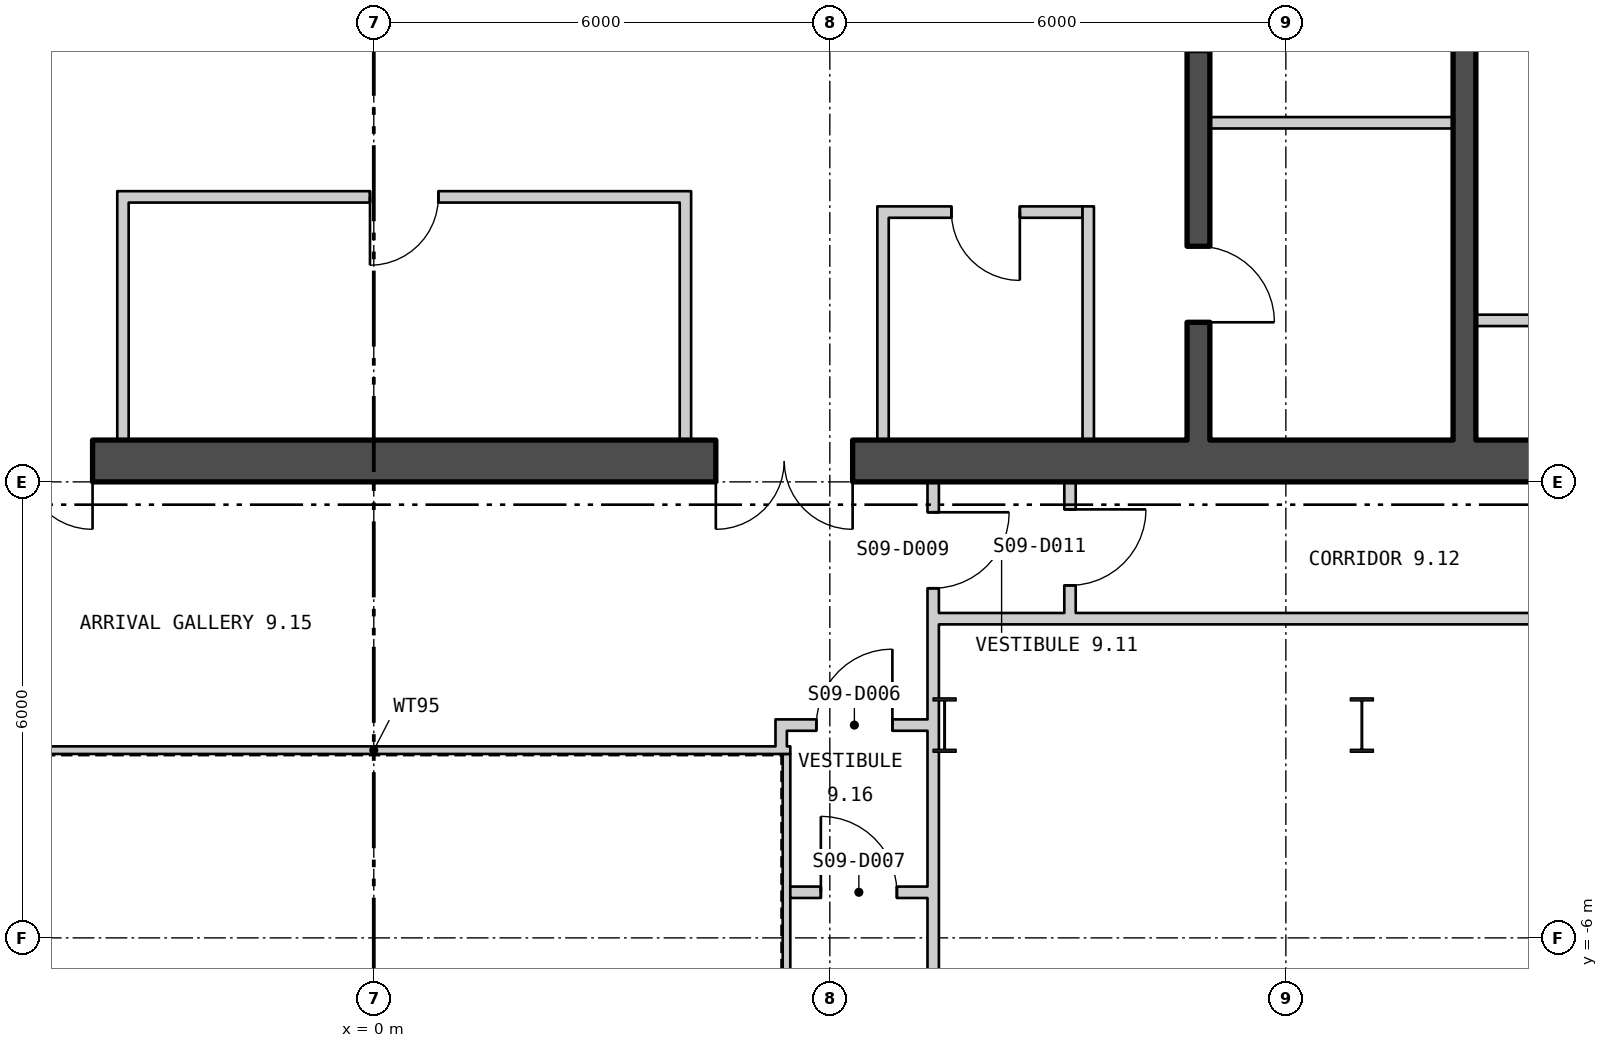
"""IFC4 building model, lengths in metres.
Left out: names, types, materials, properties, quantities, classifications, styles, units other than length and angle.
Written with IfcOpenShell. Run it as: python <this file> out.ifc"""

import sys

from ifc_helpers import new_model, si_unit, direction, frame, frame_2d, origin, origin_2d, place, context, subcontext, project, spatial, polyline, rectangle, i_section, outline, extrude, element, fill, save


model = new_model("IFC4")
c1 = context("Model", 3, precision=1e-05, world=origin(), true_north=direction((0.0, 1.0)))
c2 = subcontext(c1, "Body", "Model", "MODEL_VIEW")
j1 = project(units=[si_unit("LENGTHUNIT", "METRE"), si_unit("PLANEANGLEUNIT", "RADIAN")], contexts=[c1])
p1 = place(None, origin())
s1 = spatial("IfcSite", under=j1, at=p1, CompositionType="ELEMENT")
p2 = place(p1, origin())
s2 = spatial("IfcBuilding", under=s1, at=p2, CompositionType="ELEMENT")
p3 = place(p2, frame((0.0, 0.0, 124.8)))
s3 = spatial("IfcBuildingStorey", under=s2, at=p3, CompositionType="ELEMENT", Elevation=124.8)
for number, where, z_axis, x_axis in (
    (1, (7.51, -3.2, 0.0), (0.0, 0.0, 1.0), (1.0, 0.0, 0.0)),
    (2, (13.0, -3.2, 0.0), (0.0, 0.0, 1.0), (1.0, 0.0, 0.0)),
):
    element("IfcColumn", number, at=place(p3, frame(where, z_axis=z_axis, x_axis=x_axis)), inside=s3, PredefinedType="COLUMN", context=c2, shape_type="SweptSolid", body=[
        extrude(i_section(OverallWidth=0.304, OverallDepth=0.716, WebThickness=0.021, FlangeThickness=0.04, at=origin_2d()), origin(), (0.0, 0.0, 1.0), 4.5),
    ])
p4 = place(p3, frame((4.58, -27.57, -0.18), z_axis=(0.0, 0.0, 1.0), x_axis=(0.500000711659, 0.866024992908, 0.0)))
e3 = element("IfcWall", 3, at=p4, inside=s3, PredefinedType="SOLIDWALL", context=c2, shape_type="SweptSolid", body=[
    extrude(outline(polyline([(-0.13, -0.225), (45.87, -0.225), (45.61, 0.225), (0.13, 0.225), (-0.13, -0.225)])), origin(), (0.0, 0.0, 1.0), 4.28),
])
p5 = place(p4, frame((1.424, 0.0, 1.08)))
e4 = element("IfcOpeningElement", 4, at=p5, cuts=e3, PredefinedType="OPENING", context=c2, shape_type="SweptSolid", body=[
    extrude(rectangle(XDim=2.4, YDim=2.6, at=frame_2d((1.2, 1.3))), frame((0.0, 0.235, 0.0), z_axis=(0.0, -1.0, 0.0), x_axis=(1.0, 0.0, 0.0)), (0.0, 0.0, 1.0), 0.47),
])
p6 = place(p4, frame((5.893, 0.0, 1.08)))
e5 = element("IfcOpeningElement", 5, at=p6, cuts=e3, PredefinedType="OPENING", context=c2, shape_type="SweptSolid", body=[
    extrude(rectangle(XDim=2.4, YDim=2.6, at=frame_2d((1.2, 1.3))), frame((0.0, 0.235, 0.0), z_axis=(0.0, -1.0, 0.0), x_axis=(1.0, 0.0, 0.0)), (0.0, 0.0, 1.0), 0.47),
])
p7 = place(p4, frame((10.401, 0.0, 1.08)))
e6 = element("IfcOpeningElement", 6, at=p7, cuts=e3, PredefinedType="OPENING", context=c2, shape_type="SweptSolid", body=[
    extrude(rectangle(XDim=2.4, YDim=2.6, at=frame_2d((1.2, 1.3))), frame((0.0, 0.235, 0.0), z_axis=(0.0, -1.0, 0.0), x_axis=(1.0, 0.0, 0.0)), (0.0, 0.0, 1.0), 0.47),
])
p8 = place(p4, frame((14.909, 0.0, 1.08)))
e7 = element("IfcOpeningElement", 7, at=p8, cuts=e3, PredefinedType="OPENING", context=c2, shape_type="SweptSolid", body=[
    extrude(rectangle(XDim=2.4, YDim=2.6, at=frame_2d((1.2, 1.3))), frame((0.0, 0.235, 0.0), z_axis=(0.0, -1.0, 0.0), x_axis=(1.0, 0.0, 0.0)), (0.0, 0.0, 1.0), 0.47),
])
p9 = place(p4, frame((19.416, 0.0, 1.08)))
e8 = element("IfcOpeningElement", 8, at=p9, cuts=e3, PredefinedType="OPENING", context=c2, shape_type="SweptSolid", body=[
    extrude(rectangle(XDim=2.4, YDim=2.6, at=frame_2d((1.2, 1.3))), frame((0.0, 0.235, 0.0), z_axis=(0.0, -1.0, 0.0), x_axis=(1.0, 0.0, 0.0)), (0.0, 0.0, 1.0), 0.47),
])
p10 = place(p4, frame((23.924, 0.0, 1.08)))
e9 = element("IfcOpeningElement", 9, at=p10, cuts=e3, PredefinedType="OPENING", context=c2, shape_type="SweptSolid", body=[
    extrude(rectangle(XDim=2.4, YDim=2.6, at=frame_2d((1.2, 1.3))), frame((0.0, 0.235, 0.0), z_axis=(0.0, -1.0, 0.0), x_axis=(1.0, 0.0, 0.0)), (0.0, 0.0, 1.0), 0.47),
])
p11 = place(p4, frame((32.939, 0.0, 1.08)))
e10 = element("IfcOpeningElement", 10, at=p11, cuts=e3, PredefinedType="OPENING", context=c2, shape_type="SweptSolid", body=[
    extrude(rectangle(XDim=2.4, YDim=2.6, at=frame_2d((1.2, 1.3))), frame((0.0, 0.235, 0.0), z_axis=(0.0, -1.0, 0.0), x_axis=(1.0, 0.0, 0.0)), (0.0, 0.0, 1.0), 0.47),
])
p12 = place(p4, frame((37.447, 0.0, 1.08)))
e11 = element("IfcOpeningElement", 11, at=p12, cuts=e3, PredefinedType="OPENING", context=c2, shape_type="SweptSolid", body=[
    extrude(rectangle(XDim=2.4, YDim=2.6, at=frame_2d((1.2, 1.3))), frame((0.0, 0.235, 0.0), z_axis=(0.0, -1.0, 0.0), x_axis=(1.0, 0.0, 0.0)), (0.0, 0.0, 1.0), 0.47),
])
p13 = place(p4, frame((41.916, 0.0, 1.08)))
e12 = element("IfcOpeningElement", 12, at=p13, cuts=e3, PredefinedType="OPENING", context=c2, shape_type="SweptSolid", body=[
    extrude(rectangle(XDim=2.4, YDim=2.6, at=frame_2d((1.2, 1.3))), frame((0.0, 0.235, 0.0), z_axis=(0.0, -1.0, 0.0), x_axis=(1.0, 0.0, 0.0)), (0.0, 0.0, 1.0), 0.47),
])
p14 = place(p3, frame((5.43, -11.62, 0.0), z_axis=(0.0, 0.0, 1.0), x_axis=(0.0, 1.0, 0.0)))
e13 = element("IfcWall", 13, at=p14, inside=s3, PredefinedType="PARTITIONING", context=c2, shape_type="SweptSolid", body=[
    extrude(rectangle(XDim=8.04, YDim=0.1, at=frame_2d((4.02, 0.0))), origin(), (0.0, 0.0, 1.0), 4.3),
])
p15 = place(p3, frame((5.48, -3.53, 0.0), z_axis=(0.0, 0.0, 1.0), x_axis=(-1.0, 0.0, 0.0)))
e14 = element("IfcWall", 14, at=p15, inside=s3, PredefinedType="PARTITIONING", context=c2, shape_type="SweptSolid", body=[
    extrude(rectangle(XDim=10.96, YDim=0.1, at=frame_2d((5.48, 0.0))), origin(), (0.0, 0.0, 1.0), 4.3),
])
p16 = place(p3, frame((-17.5, 0.275, 0.0), z_axis=(0.0, 0.0, 1.0), x_axis=(1.0, 0.0, 0.0)))
e15 = element("IfcWall", 15, at=p16, inside=s3, PredefinedType="SHEAR", context=c2, shape_type="SweptSolid", body=[
    extrude(rectangle(XDim=35.0, YDim=0.55, at=frame_2d((17.5, 0.0))), origin(), (0.0, 0.0, 1.0), 4.3),
])
p17 = place(p16, frame((12.0, 0.0, 0.0)))
e16 = element("IfcOpeningElement", 16, at=p17, cuts=e15, PredefinedType="OPENING", context=c2, shape_type="SweptSolid", body=[
    extrude(rectangle(XDim=1.8, YDim=2.4, at=frame_2d((0.9, 1.2))), frame((0.0, 0.285, 0.0), z_axis=(0.0, -1.0, 0.0), x_axis=(1.0, 0.0, 0.0)), (0.0, 0.0, 1.0), 0.57),
])
p18 = place(p16, frame((22.0, 0.0, 0.0)))
e17 = element("IfcOpeningElement", 17, at=p18, cuts=e15, PredefinedType="OPENING", context=c2, shape_type="SweptSolid", body=[
    extrude(rectangle(XDim=1.8, YDim=2.4, at=frame_2d((0.9, 1.2))), frame((0.0, 0.285, 0.0), z_axis=(0.0, -1.0, 0.0), x_axis=(1.0, 0.0, 0.0)), (0.0, 0.0, 1.0), 0.57),
])
p19 = place(p3, frame((10.85, 0.55, 0.0), z_axis=(0.0, 0.0, 1.0), x_axis=(0.0, 1.0, 0.0)))
e18 = element("IfcWall", 18, at=p19, inside=s3, PredefinedType="SHEAR", context=c2, shape_type="SweptSolid", body=[
    extrude(rectangle(XDim=16.9, YDim=0.3, at=frame_2d((8.45, 0.0))), origin(), (0.0, 0.0, 1.0), 4.3),
])
p20 = place(p19, frame((5.125, 0.0, 0.0)))
e19 = element("IfcOpeningElement", 19, at=p20, cuts=e18, PredefinedType="OPENING", context=c2, shape_type="SweptSolid", body=[
    extrude(rectangle(XDim=1.25, YDim=2.1, at=frame_2d((0.625, 1.05))), frame((0.0, 0.16, 0.0), z_axis=(0.0, -1.0, 0.0), x_axis=(1.0, 0.0, 0.0)), (0.0, 0.0, 1.0), 0.32),
])
p21 = place(p19, frame((1.55, 0.0, 0.0)))
e20 = element("IfcOpeningElement", 20, at=p21, cuts=e18, PredefinedType="OPENING", context=c2, shape_type="SweptSolid", body=[
    extrude(rectangle(XDim=1.0, YDim=2.1, at=frame_2d((0.5, 1.05))), frame((0.0, 0.16, 0.0), z_axis=(0.0, -1.0, 0.0), x_axis=(1.0, 0.0, 0.0)), (0.0, 0.0, 1.0), 0.32),
])
p22 = place(p3, frame((14.35, 0.55, 0.0), z_axis=(0.0, 0.0, 1.0), x_axis=(0.0, 1.0, 0.0)))
e21 = element("IfcWall", 21, at=p22, inside=s3, PredefinedType="SHEAR", context=c2, shape_type="SweptSolid", body=[
    extrude(rectangle(XDim=16.9, YDim=0.3, at=frame_2d((8.45, 0.0))), origin(), (0.0, 0.0, 1.0), 4.3),
])
p23 = place(p22, frame((5.75, 0.0, 0.0)))
e22 = element("IfcOpeningElement", 22, at=p23, cuts=e21, PredefinedType="OPENING", context=c2, shape_type="SweptSolid", body=[
    extrude(rectangle(XDim=1.5, YDim=2.1, at=frame_2d((0.75, 1.05))), frame((0.0, 0.16, 0.0), z_axis=(0.0, -1.0, 0.0), x_axis=(1.0, 0.0, 0.0)), (0.0, 0.0, 1.0), 0.32),
])
p24 = place(p3, frame((11.0, 4.725, 0.0), z_axis=(0.0, 0.0, 1.0), x_axis=(1.0, 0.0, 0.0)))
e23 = element("IfcWall", 23, at=p24, inside=s3, PredefinedType="PARTITIONING", context=c2, shape_type="SweptSolid", body=[
    extrude(rectangle(XDim=3.2, YDim=0.15, at=frame_2d((1.6, 0.0))), origin(), (0.0, 0.0, 1.0), 4.3),
])
p25 = place(p3, frame((14.5, 2.125, 0.0), z_axis=(0.0, 0.0, 1.0), x_axis=(1.0, 0.0, 0.0)))
e24 = element("IfcWall", 24, at=p25, inside=s3, PredefinedType="PARTITIONING", context=c2, shape_type="SweptSolid", body=[
    extrude(rectangle(XDim=2.45, YDim=0.15, at=frame_2d((1.225, 0.0))), origin(), (0.0, 0.0, 1.0), 4.3),
])
for number, where, z_axis, x_axis in (
    (25, (-3.3, 0.55, 0.0), (0.0, 0.0, 1.0), (0.0, 1.0, 0.0)),
    (26, (4.1, 0.55, 0.0), (0.0, 0.0, 1.0), (0.0, 1.0, 0.0)),
):
    element("IfcWall", number, at=place(p3, frame(where, z_axis=z_axis, x_axis=x_axis)), inside=s3, PredefinedType="PARTITIONING", context=c2, shape_type="SweptSolid", body=[
        extrude(rectangle(XDim=3.275, YDim=0.15, at=frame_2d((1.637, 0.0))), origin(), (0.0, 0.0, 1.0), 4.3),
    ])
p26 = place(p3, frame((-3.225, 3.75, 0.0), z_axis=(0.0, 0.0, 1.0), x_axis=(1.0, 0.0, 0.0)))
e27 = element("IfcWall", 27, at=p26, inside=s3, PredefinedType="PARTITIONING", context=c2, shape_type="SweptSolid", body=[
    extrude(rectangle(XDim=7.25, YDim=0.15, at=frame_2d((3.625, 0.0))), origin(), (0.0, 0.0, 1.0), 4.3),
])
p27 = place(p26, frame((3.175, 0.0, 0.0)))
e28 = element("IfcOpeningElement", 28, at=p27, cuts=e27, PredefinedType="OPENING", context=c2, shape_type="SweptSolid", body=[
    extrude(rectangle(XDim=0.9, YDim=2.1, at=frame_2d((0.45, 1.05))), frame((0.0, 0.085, 0.0), z_axis=(0.0, -1.0, 0.0), x_axis=(1.0, 0.0, 0.0)), (0.0, 0.0, 1.0), 0.17),
])
for number, where, z_axis, x_axis in (
    (29, (6.7, 0.55, 0.0), (0.0, 0.0, 1.0), (0.0, 1.0, 0.0)),
    (30, (9.4, 0.55, 0.0), (0.0, 0.0, 1.0), (0.0, 1.0, 0.0)),
):
    element("IfcWall", number, at=place(p3, frame(where, z_axis=z_axis, x_axis=x_axis)), inside=s3, PredefinedType="PARTITIONING", context=c2, shape_type="SweptSolid", body=[
        extrude(rectangle(XDim=3.075, YDim=0.15, at=frame_2d((1.538, 0.0))), origin(), (0.0, 0.0, 1.0), 4.3),
    ])
p28 = place(p3, frame((6.775, 3.55, 0.0), z_axis=(0.0, 0.0, 1.0), x_axis=(1.0, 0.0, 0.0)))
e31 = element("IfcWall", 31, at=p28, inside=s3, PredefinedType="PARTITIONING", context=c2, shape_type="SweptSolid", body=[
    extrude(rectangle(XDim=2.55, YDim=0.15, at=frame_2d((1.275, 0.0))), origin(), (0.0, 0.0, 1.0), 4.3),
])
p29 = place(p28, frame((0.825, 0.0, 0.0)))
e32 = element("IfcOpeningElement", 32, at=p29, cuts=e31, PredefinedType="OPENING", context=c2, shape_type="SweptSolid", body=[
    extrude(rectangle(XDim=0.9, YDim=2.1, at=frame_2d((0.45, 1.05))), frame((0.0, 0.085, 0.0), z_axis=(0.0, -1.0, 0.0), x_axis=(1.0, 0.0, 0.0)), (0.0, 0.0, 1.0), 0.17),
])
p30 = place(p3, frame((5.285, -3.2, 0.0), z_axis=(0.0, 0.0, 1.0), x_axis=(1.0, 0.0, 0.0)))
e33 = element("IfcWall", 33, at=p30, inside=s3, PredefinedType="PARTITIONING", context=c2, shape_type="SweptSolid", body=[
    extrude(rectangle(XDim=2.0, YDim=0.15, at=frame_2d((1.0, 0.0))), origin(), (0.0, 0.0, 1.0), 3.39),
])
p31 = place(p30, frame((0.538, 0.0, 0.0)))
e34 = element("IfcOpeningElement", 34, at=p31, cuts=e33, PredefinedType="OPENING", context=c2, shape_type="SweptSolid", body=[
    extrude(rectangle(XDim=1.0, YDim=2.1, at=frame_2d((0.5, 1.05))), frame((0.0, 0.085, 0.0), z_axis=(0.0, -1.0, 0.0), x_axis=(1.0, 0.0, 0.0)), (0.0, 0.0, 1.0), 0.17),
])
p32 = place(p3, frame((5.36, -3.48, 0.0), z_axis=(0.0, 0.0, 1.0), x_axis=(0.0, 1.0, 0.0)))
e35 = element("IfcWall", 35, at=p32, inside=s3, PredefinedType="PARTITIONING", context=c2, shape_type="SweptSolid", body=[
    extrude(rectangle(XDim=0.205, YDim=0.15, at=frame_2d((0.102, 0.0))), origin(), (0.0, 0.0, 1.0), 4.3),
])
p33 = place(p3, frame((5.48, -5.4, 0.0), z_axis=(0.0, 0.0, 1.0), x_axis=(1.0, 0.0, 0.0)))
e36 = element("IfcWall", 36, at=p33, inside=s3, PredefinedType="PARTITIONING", context=c2, shape_type="SweptSolid", body=[
    extrude(rectangle(XDim=1.805, YDim=0.15, at=frame_2d((0.902, 0.0))), origin(), (0.0, 0.0, 1.0), 4.3),
])
p34 = place(p33, frame((0.402, 0.0, 0.0)))
e37 = element("IfcOpeningElement", 37, at=p34, cuts=e36, PredefinedType="OPENING", context=c2, shape_type="SweptSolid", body=[
    extrude(rectangle(XDim=1.0, YDim=2.1, at=frame_2d((0.5, 1.05))), frame((0.0, 0.085, 0.0), z_axis=(0.0, -1.0, 0.0), x_axis=(1.0, 0.0, 0.0)), (0.0, 0.0, 1.0), 0.17),
])
p35 = place(p3, frame((7.36, -13.675, 0.0), z_axis=(0.0, 0.0, 1.0), x_axis=(0.0, 1.0, 0.0)))
e38 = element("IfcWall", 38, at=p35, inside=s3, PredefinedType="PARTITIONING", context=c2, shape_type="SweptSolid", body=[
    extrude(rectangle(XDim=10.167, YDim=0.15, at=frame_2d((5.083, 0.0))), origin(), (0.0, 0.0, 1.0), 3.7),
])
p36 = place(p35, frame((3.531, 0.0, 0.0)))
e39 = element("IfcOpeningElement", 39, at=p36, cuts=e38, PredefinedType="OPENING", context=c2, shape_type="SweptSolid", body=[
    extrude(rectangle(XDim=1.0, YDim=2.1, at=frame_2d((0.5, 1.05))), frame((0.0, 0.085, 0.0), z_axis=(0.0, -1.0, 0.0), x_axis=(1.0, 0.0, 0.0)), (0.0, 0.0, 1.0), 0.17),
])
p37 = place(p3, frame((7.36, -3.508, 0.0), z_axis=(0.0, 0.0, 1.0), x_axis=(0.0, 1.0, 0.0)))
e40 = element("IfcWall", 40, at=p37, inside=s3, PredefinedType="PARTITIONING", context=c2, shape_type="SweptSolid", body=[
    extrude(rectangle(XDim=3.508, YDim=0.15, at=frame_2d((1.754, 0.0))), origin(), (0.0, 0.0, 1.0), 4.3),
])
p38 = place(p37, frame((2.108, 0.0, 0.0)))
e41 = element("IfcOpeningElement", 41, at=p38, cuts=e40, PredefinedType="OPENING", context=c2, shape_type="SweptSolid", body=[
    extrude(rectangle(XDim=1.0, YDim=2.1, at=frame_2d((0.5, 1.05))), frame((0.0, 0.085, 0.0), z_axis=(0.0, -1.0, 0.0), x_axis=(1.0, 0.0, 0.0)), (0.0, 0.0, 1.0), 0.17),
])
p39 = place(p3, frame((7.435, -1.8, 0.0), z_axis=(0.0, 0.0, 1.0), x_axis=(1.0, 0.0, 0.0)))
e42 = element("IfcWall", 42, at=p39, inside=s3, PredefinedType="PARTITIONING", context=c2, shape_type="SweptSolid", body=[
    extrude(rectangle(XDim=11.763, YDim=0.15, at=frame_2d((5.881, 0.0))), origin(), (0.0, 0.0, 1.0), 4.3),
])
p40 = place(p39, frame((8.877, 0.0, 0.0)))
e43 = element("IfcOpeningElement", 43, at=p40, cuts=e42, PredefinedType="OPENING", context=c2, shape_type="SweptSolid", body=[
    extrude(rectangle(XDim=1.0, YDim=2.1, at=frame_2d((0.5, 1.05))), frame((0.0, 0.085, 0.0), z_axis=(0.0, -1.0, 0.0), x_axis=(1.0, 0.0, 0.0)), (0.0, 0.0, 1.0), 0.17),
])
p41 = place(p3, frame((9.16, -1.725, 0.0), z_axis=(0.0, 0.0, 1.0), x_axis=(0.0, 1.0, 0.0)))
e44 = element("IfcWall", 44, at=p41, inside=s3, PredefinedType="PARTITIONING", context=c2, shape_type="SweptSolid", body=[
    extrude(rectangle(XDim=1.725, YDim=0.15, at=frame_2d((0.863, 0.0))), origin(), (0.0, 0.0, 1.0), 4.3),
])
p42 = place(p41, frame((0.363, 0.0, 0.0)))
e45 = element("IfcOpeningElement", 45, at=p42, cuts=e44, PredefinedType="OPENING", context=c2, shape_type="SweptSolid", body=[
    extrude(rectangle(XDim=1.0, YDim=2.1, at=frame_2d((0.5, 1.05))), frame((0.0, 0.085, 0.0), z_axis=(0.0, -1.0, 0.0), x_axis=(1.0, 0.0, 0.0)), (0.0, 0.0, 1.0), 0.17),
])
p43 = place(p21, origin())
e46 = element("IfcDoor", 46, at=p43, inside=s3, OperationType="SINGLE_SWING_LEFT", PredefinedType="DOOR", context=c2, shape_type="SweptSolid", body=[
    extrude(rectangle(XDim=1.0, YDim=2.1, at=frame_2d((0.5, 1.05))), frame((0.0, 0.025, 0.0), z_axis=(0.0, -1.0, 0.0), x_axis=(1.0, 0.0, 0.0)), (0.0, 0.0, 1.0), 0.05),
])
fill(e20, e46)
p44 = place(p27, origin())
e47 = element("IfcDoor", 47, at=p44, inside=s3, OperationType="SINGLE_SWING_LEFT", PredefinedType="DOOR", context=c2, shape_type="SweptSolid", body=[
    extrude(rectangle(XDim=0.9, YDim=2.1, at=frame_2d((0.45, 1.05))), frame((0.0, 0.025, 0.0), z_axis=(0.0, -1.0, 0.0), x_axis=(1.0, 0.0, 0.0)), (0.0, 0.0, 1.0), 0.05),
])
fill(e28, e47)
p45 = place(p29, origin())
e48 = element("IfcDoor", 48, at=p45, inside=s3, OperationType="SINGLE_SWING_RIGHT", PredefinedType="DOOR", context=c2, shape_type="SweptSolid", body=[
    extrude(rectangle(XDim=0.9, YDim=2.1, at=frame_2d((0.45, 1.05))), frame((0.0, 0.025, 0.0), z_axis=(0.0, -1.0, 0.0), x_axis=(1.0, 0.0, 0.0)), (0.0, 0.0, 1.0), 0.05),
])
fill(e32, e48)
p46 = place(p17, origin())
e49 = element("IfcDoor", 49, at=p46, inside=s3, OperationType="DOUBLE_DOOR_SINGLE_SWING", PredefinedType="DOOR", context=c2, shape_type="SweptSolid", body=[
    extrude(rectangle(XDim=1.8, YDim=2.4, at=frame_2d((0.9, 1.2))), frame((0.0, 0.025, 0.0), z_axis=(0.0, -1.0, 0.0), x_axis=(1.0, 0.0, 0.0)), (0.0, 0.0, 1.0), 0.05),
])
fill(e16, e49)
p47 = place(p18, origin())
e50 = element("IfcDoor", 50, at=p47, inside=s3, OperationType="DOUBLE_DOOR_SINGLE_SWING", PredefinedType="DOOR", context=c2, shape_type="SweptSolid", body=[
    extrude(rectangle(XDim=1.8, YDim=2.4, at=frame_2d((0.9, 1.2))), frame((0.0, 0.025, 0.0), z_axis=(0.0, -1.0, 0.0), x_axis=(1.0, 0.0, 0.0)), (0.0, 0.0, 1.0), 0.05),
])
fill(e17, e50)
p48 = place(p31, origin())
e51 = element("IfcDoor", 51, at=p48, inside=s3, OperationType="SINGLE_SWING_LEFT", PredefinedType="DOOR", context=c2, shape_type="SweptSolid", body=[
    extrude(rectangle(XDim=1.0, YDim=2.1, at=frame_2d((0.5, 1.05))), frame((0.0, 0.025, 0.0), z_axis=(0.0, -1.0, 0.0), x_axis=(1.0, 0.0, 0.0)), (0.0, 0.0, 1.0), 0.05),
])
fill(e34, e51)
p49 = place(p34, origin())
e52 = element("IfcDoor", 52, at=p49, inside=s3, OperationType="SINGLE_SWING_RIGHT", PredefinedType="DOOR", context=c2, shape_type="SweptSolid", body=[
    extrude(rectangle(XDim=1.0, YDim=2.1, at=frame_2d((0.5, 1.05))), frame((0.0, 0.025, 0.0), z_axis=(0.0, -1.0, 0.0), x_axis=(1.0, 0.0, 0.0)), (0.0, 0.0, 1.0), 0.05),
])
fill(e37, e52)
p50 = place(p38, origin())
e53 = element("IfcDoor", 53, at=p50, inside=s3, OperationType="SINGLE_SWING_RIGHT", PredefinedType="DOOR", context=c2, shape_type="SweptSolid", body=[
    extrude(rectangle(XDim=1.0, YDim=2.1, at=frame_2d((0.5, 1.05))), frame((0.0, 0.025, 0.0), z_axis=(0.0, -1.0, 0.0), x_axis=(1.0, 0.0, 0.0)), (0.0, 0.0, 1.0), 0.05),
])
fill(e41, e53)
p51 = place(p42, origin())
e54 = element("IfcDoor", 54, at=p51, inside=s3, OperationType="SINGLE_SWING_RIGHT", PredefinedType="DOOR", context=c2, shape_type="SweptSolid", body=[
    extrude(rectangle(XDim=1.0, YDim=2.1, at=frame_2d((0.5, 1.05))), frame((0.0, 0.025, 0.0), z_axis=(0.0, -1.0, 0.0), x_axis=(1.0, 0.0, 0.0)), (0.0, 0.0, 1.0), 0.05),
])
fill(e45, e54)
save(model, sys.argv[1])
